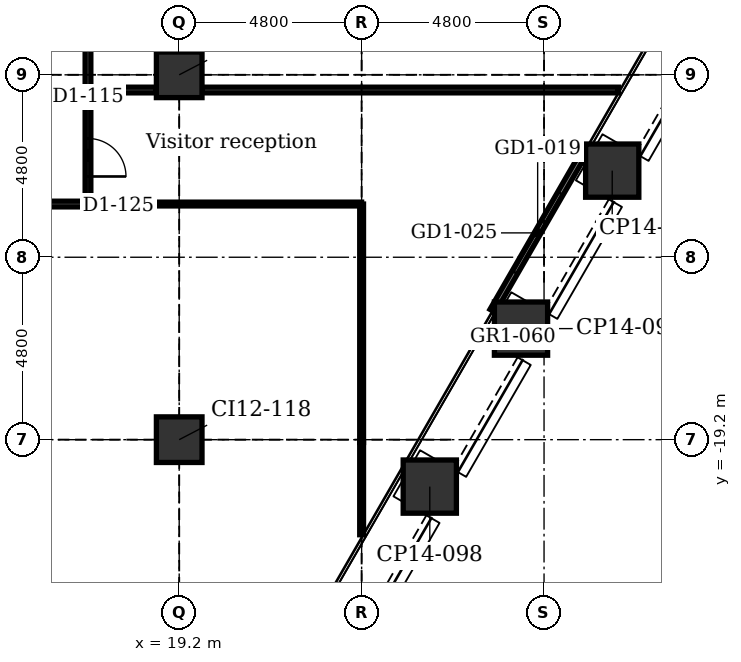
"""IFC4 building model, lengths in metres.
Left out: names, types, materials, properties, quantities, classifications, styles, units other than length and angle.
Written with IfcOpenShell. Run it as: python <this file> out.ifc"""

import sys

from ifc_helpers import new_model, si_unit, direction, frame, frame_2d, origin, origin_2d, place, context, subcontext, project, spatial, rectangle, extrude, element, fill, save


model = new_model("IFC4")
c1 = context("Model", 3, precision=1e-05, world=origin(), true_north=direction((0.0, 1.0)))
c2 = subcontext(c1, "Body", "Model", "MODEL_VIEW")
j1 = project(units=[si_unit("LENGTHUNIT", "METRE"), si_unit("PLANEANGLEUNIT", "RADIAN")], contexts=[c1])
p1 = place(None, origin())
s1 = spatial("IfcSite", under=j1, at=p1, CompositionType="ELEMENT")
p2 = place(p1, origin())
s2 = spatial("IfcBuilding", under=s1, at=p2, CompositionType="ELEMENT")
p3 = place(p2, frame((0.0, 0.0, 44.4)))
s3 = spatial("IfcBuildingStorey", under=s2, at=p3, CompositionType="ELEMENT", Elevation=44.4)
for number, where, z_axis, x_axis in (
    (1, (30.594, -12.121, -0.25), (0.0, 0.0, 1.0), (0.5, 0.866, 0.0)),
    (2, (28.194, -16.278, -0.25), (0.0, 0.0, 1.0), (0.5, 0.866, 0.0)),
    (3, (25.794, -20.435, -0.25), (0.0, 0.0, 1.0), (0.5, 0.866, 0.0)),
):
    element("IfcColumn", number, at=place(p3, frame(where, z_axis=z_axis, x_axis=x_axis)), inside=s3, PredefinedType="COLUMN", context=c2, shape_type="SweptSolid", body=[
        extrude(rectangle(XDim=1.4, YDim=1.4, at=origin_2d()), origin(), (0.0, 0.0, 1.0), 5.5),
    ])
for number, where, z_axis, x_axis in (
    (4, (19.2, -19.2, -0.25), (0.0, 0.0, 1.0), (1.0, 0.0, 0.0)),
    (5, (19.2, -9.6, -0.25), (0.0, 0.0, 1.0), (1.0, 0.0, 0.0)),
):
    element("IfcColumn", number, at=place(p3, frame(where, z_axis=z_axis, x_axis=x_axis)), inside=s3, PredefinedType="COLUMN", context=c2, shape_type="SweptSolid", body=[
        extrude(rectangle(XDim=1.2, YDim=1.2, at=origin_2d()), origin(), (0.0, 0.0, 1.0), 5.5),
    ])
p4 = place(p3, frame((29.817, -11.707, 0.0), z_axis=(0.0, 0.0, 1.0), x_axis=(-0.499978080042, -0.866038058908, 0.0)))
e6 = element("IfcWall", 6, at=p4, inside=s3, PredefinedType="PARTITIONING", context=c2, shape_type="SweptSolid", body=[
    extrude(rectangle(XDim=4.74, YDim=0.16, at=frame_2d((2.37, 0.0))), origin(), (0.0, 0.0, 1.0), 5.25),
])
p5 = place(p4, frame((1.17, 0.0, 0.0)))
e7 = element("IfcOpeningElement", 7, at=p5, cuts=e6, PredefinedType="OPENING", context=c2, shape_type="SweptSolid", body=[
    extrude(rectangle(XDim=2.4, YDim=2.4, at=frame_2d((1.2, 1.2))), frame((0.0, 0.09, 0.0), z_axis=(0.0, -1.0, 0.0), x_axis=(1.0, 0.0, 0.0)), (0.0, 0.0, 1.0), 0.18),
])
p6 = place(p3, frame((24.0, -19.274, 0.0), z_axis=(0.0, 0.0, 1.0), x_axis=(0.0, 1.0, 0.0)))
e8 = element("IfcWall", 8, at=p6, inside=s3, PredefinedType="PARTITIONING", context=c2, shape_type="SweptSolid", body=[
    extrude(rectangle(XDim=6.274, YDim=0.1, at=frame_2d((3.137, 0.0))), origin(), (0.0, 0.0, 1.0), 4.717),
])
p7 = place(p3, frame((24.0, -21.701, 0.0), z_axis=(0.0, 0.0, 1.0), x_axis=(0.0, 1.0, 0.0)))
e9 = element("IfcWall", 9, at=p7, inside=s3, PredefinedType="PARTITIONING", context=c2, shape_type="SweptSolid", body=[
    extrude(rectangle(XDim=2.427, YDim=0.1, at=frame_2d((1.214, 0.0))), origin(), (0.0, 0.0, 1.0), 4.94),
])
p8 = place(p3, frame((16.8, -13.0, 0.0), z_axis=(0.0, 0.0, 1.0), x_axis=(0.0, 1.0, 0.0)))
e10 = element("IfcWall", 10, at=p8, inside=s3, PredefinedType="PARTITIONING", context=c2, shape_type="SweptSolid", body=[
    extrude(rectangle(XDim=9.05, YDim=0.15, at=frame_2d((4.525, 0.0))), origin(), (0.0, 0.0, 1.0), 5.25),
])
p9 = place(p8, frame((0.725, 0.0, 0.0)))
e11 = element("IfcOpeningElement", 11, at=p9, cuts=e10, PredefinedType="OPENING", context=c2, shape_type="SweptSolid", body=[
    extrude(rectangle(XDim=1.0, YDim=2.1, at=frame_2d((0.5, 1.05))), frame((0.0, 0.085, 0.0), z_axis=(0.0, -1.0, 0.0), x_axis=(1.0, 0.0, 0.0)), (0.0, 0.0, 1.0), 0.17),
])
p10 = place(p8, frame((5.8, 0.0, 0.0)))
e12 = element("IfcOpeningElement", 12, at=p10, cuts=e10, PredefinedType="OPENING", context=c2, shape_type="SweptSolid", body=[
    extrude(rectangle(XDim=1.0, YDim=2.1, at=frame_2d((0.5, 1.05))), frame((0.0, 0.085, 0.0), z_axis=(0.0, -1.0, 0.0), x_axis=(1.0, 0.0, 0.0)), (0.0, 0.0, 1.0), 0.17),
])
p11 = place(p3, frame((16.8, -13.0, 0.0), z_axis=(0.0, 0.0, 1.0), x_axis=(1.0, 0.0, 0.0)))
e13 = element("IfcWall", 13, at=p11, inside=s3, PredefinedType="PARTITIONING", context=c2, shape_type="SweptSolid", body=[
    extrude(rectangle(XDim=7.2, YDim=0.1, at=frame_2d((3.6, 0.0))), origin(), (0.0, 0.0, 1.0), 5.25),
])
p12 = place(p3, frame((-24.0, -13.0, 0.0), z_axis=(0.0, 0.0, 1.0), x_axis=(1.0, 0.0, 0.0)))
e14 = element("IfcWall", 14, at=p12, inside=s3, PredefinedType="PARTITIONING", context=c2, shape_type="SweptSolid", body=[
    extrude(rectangle(XDim=40.8, YDim=0.15, at=frame_2d((20.4, 0.0))), origin(), (0.0, 0.0, 1.0), 5.25),
])
p13 = place(p12, frame((9.225, 0.0, 0.0)))
e15 = element("IfcOpeningElement", 15, at=p13, cuts=e14, PredefinedType="OPENING", context=c2, shape_type="SweptSolid", body=[
    extrude(rectangle(XDim=1.8, YDim=2.1, at=frame_2d((0.9, 1.05))), frame((0.0, 0.085, 0.0), z_axis=(0.0, -1.0, 0.0), x_axis=(1.0, 0.0, 0.0)), (0.0, 0.0, 1.0), 0.17),
])
p14 = place(p12, frame((12.7, 0.0, 0.0)))
e16 = element("IfcOpeningElement", 16, at=p14, cuts=e14, PredefinedType="OPENING", context=c2, shape_type="SweptSolid", body=[
    extrude(rectangle(XDim=1.0, YDim=2.1, at=frame_2d((0.5, 1.05))), frame((0.0, 0.085, 0.0), z_axis=(0.0, -1.0, 0.0), x_axis=(1.0, 0.0, 0.0)), (0.0, 0.0, 1.0), 0.17),
])
p15 = place(p12, frame((18.7, 0.0, 0.0)))
e17 = element("IfcOpeningElement", 17, at=p15, cuts=e14, PredefinedType="OPENING", context=c2, shape_type="SweptSolid", body=[
    extrude(rectangle(XDim=1.0, YDim=2.1, at=frame_2d((0.5, 1.05))), frame((0.0, 0.085, 0.0), z_axis=(0.0, -1.0, 0.0), x_axis=(1.0, 0.0, 0.0)), (0.0, 0.0, 1.0), 0.17),
])
p16 = place(p12, frame((29.625, 0.0, 0.0)))
e18 = element("IfcOpeningElement", 18, at=p16, cuts=e14, PredefinedType="OPENING", context=c2, shape_type="SweptSolid", body=[
    extrude(rectangle(XDim=1.8, YDim=2.1, at=frame_2d((0.9, 1.05))), frame((0.0, 0.085, 0.0), z_axis=(0.0, -1.0, 0.0), x_axis=(1.0, 0.0, 0.0)), (0.0, 0.0, 1.0), 0.17),
])
p17 = place(p12, frame((37.875, 0.0, 0.0)))
e19 = element("IfcOpeningElement", 19, at=p17, cuts=e14, PredefinedType="OPENING", context=c2, shape_type="SweptSolid", body=[
    extrude(rectangle(XDim=1.8, YDim=2.1, at=frame_2d((0.9, 1.05))), frame((0.0, 0.085, 0.0), z_axis=(0.0, -1.0, 0.0), x_axis=(1.0, 0.0, 0.0)), (0.0, 0.0, 1.0), 0.17),
])
p18 = place(p12, frame((15.4, 0.0, 0.9)))
e20 = element("IfcOpeningElement", 20, at=p18, cuts=e14, PredefinedType="OPENING", context=c2, shape_type="SweptSolid", body=[
    extrude(rectangle(XDim=1.8, YDim=1.5, at=frame_2d((0.9, 0.75))), frame((0.0, 0.085, 0.0), z_axis=(0.0, -1.0, 0.0), x_axis=(1.0, 0.0, 0.0)), (0.0, 0.0, 1.0), 0.17),
])
p19 = place(p3, frame((16.8, -10.0, 0.0), z_axis=(0.0, 0.0, 1.0), x_axis=(1.0, 0.0, 0.0)))
e21 = element("IfcWall", 21, at=p19, inside=s3, PredefinedType="PARTITIONING", context=c2, shape_type="SweptSolid", body=[
    extrude(rectangle(XDim=1.8, YDim=0.15, at=frame_2d((0.9, 0.0))), origin(), (0.0, 0.0, 1.0), 5.25),
])
p20 = place(p3, frame((19.8, -10.0, 0.0), z_axis=(0.0, 0.0, 1.0), x_axis=(1.0, 0.0, 0.0)))
e22 = element("IfcWall", 22, at=p20, inside=s3, PredefinedType="PARTITIONING", context=c2, shape_type="SweptSolid", body=[
    extrude(rectangle(XDim=10.956, YDim=0.15, at=frame_2d((5.478, 0.0))), origin(), (0.0, 0.0, 1.0), 5.25),
])
p21 = place(p5, origin())
e23 = element("IfcDoor", 23, at=p21, inside=s3, OperationType="DOUBLE_DOOR_SLIDING", PredefinedType="DOOR", context=c2, shape_type="SweptSolid", body=[
    extrude(rectangle(XDim=2.4, YDim=2.4, at=frame_2d((1.2, 1.2))), frame((0.0, 0.025, 0.0), z_axis=(0.0, -1.0, 0.0), x_axis=(1.0, 0.0, 0.0)), (0.0, 0.0, 1.0), 0.05),
])
fill(e7, e23)
p22 = place(p9, frame((1.0, 0.0, 0.0), z_axis=(0.0, 0.0, 1.0), x_axis=(-1.0, 0.0, 0.0)))
e24 = element("IfcDoor", 24, at=p22, inside=s3, OperationType="SINGLE_SWING_LEFT", PredefinedType="DOOR", context=c2, shape_type="SweptSolid", body=[
    extrude(rectangle(XDim=1.0, YDim=2.1, at=frame_2d((0.5, 1.05))), frame((0.0, 0.025, 0.0), z_axis=(0.0, -1.0, 0.0), x_axis=(1.0, 0.0, 0.0)), (0.0, 0.0, 1.0), 0.05),
])
fill(e11, e24)
save(model, sys.argv[1])
